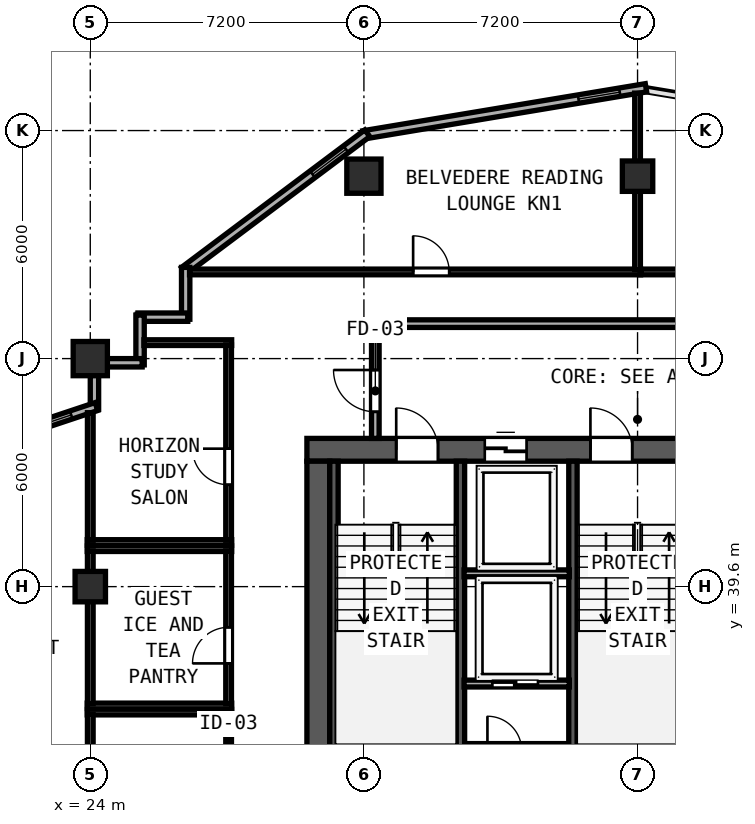
"""IFC4 building model, lengths in metres.
Left out: names, types, materials, properties, quantities, classifications, styles, units other than length and angle.
Written with IfcOpenShell. Run it as: python <this file> out.ifc"""

import sys

from ifc_helpers import new_model, si_unit, direction, frame, frame_2d, origin, origin_2d, place, context, subcontext, project, spatial, rectangle, hollow_rectangle, extrude, element, fill, save


model = new_model("IFC4")
c1 = context("Model", 3, precision=1e-05, world=origin(), true_north=direction((0.0, 1.0)))
c2 = subcontext(c1, "Body", "Model", "MODEL_VIEW")
j1 = project(units=[si_unit("LENGTHUNIT", "METRE"), si_unit("PLANEANGLEUNIT", "RADIAN")], contexts=[c1])
p1 = place(None, origin())
s1 = spatial("IfcSite", under=j1, at=p1, CompositionType="ELEMENT")
p2 = place(p1, origin())
s2 = spatial("IfcBuilding", under=s1, at=p2, CompositionType="ELEMENT")
p3 = place(p2, frame((0.0, 0.0, 176.6)))
s3 = spatial("IfcBuildingStorey", under=s2, at=p3, CompositionType="ELEMENT", Elevation=176.6)
p4 = place(p3, frame((29.7, 43.2, 0.0), z_axis=(0.0, 0.0, 1.0), x_axis=(1.0, 0.0, 0.0)))
e1 = element("IfcWall", 1, at=p4, inside=s3, PredefinedType="SHEAR", context=c2, shape_type="SweptSolid", body=[
    extrude(rectangle(XDim=17.4, YDim=0.6, at=frame_2d((8.7, 0.0))), origin(), (0.0, 0.0, 1.0), 3.62),
])
p5 = place(p4, frame((2.35, 0.0, 0.0)))
e2 = element("IfcOpeningElement", 2, at=p5, cuts=e1, PredefinedType="OPENING", context=c2, shape_type="SweptSolid", body=[
    extrude(rectangle(XDim=1.1, YDim=2.15, at=frame_2d((0.55, 1.075))), frame((0.0, 0.31, 0.0), z_axis=(0.0, -1.0, 0.0), x_axis=(1.0, 0.0, 0.0)), (0.0, 0.0, 1.0), 0.62),
])
p6 = place(p4, frame((7.46, 0.0, 0.0)))
e3 = element("IfcOpeningElement", 3, at=p6, cuts=e1, PredefinedType="OPENING", context=c2, shape_type="SweptSolid", body=[
    extrude(rectangle(XDim=1.1, YDim=2.15, at=frame_2d((0.55, 1.075))), frame((0.0, 0.31, 0.0), z_axis=(0.0, -1.0, 0.0), x_axis=(1.0, 0.0, 0.0)), (0.0, 0.0, 1.0), 0.62),
])
p7 = place(p4, frame((13.55, 0.0, 0.0)))
e4 = element("IfcOpeningElement", 4, at=p7, cuts=e1, PredefinedType="OPENING", context=c2, shape_type="SweptSolid", body=[
    extrude(rectangle(XDim=1.1, YDim=2.15, at=frame_2d((0.55, 1.075))), frame((0.0, 0.31, 0.0), z_axis=(0.0, -1.0, 0.0), x_axis=(1.0, 0.0, 0.0)), (0.0, 0.0, 1.0), 0.62),
])
p8 = place(p4, frame((4.68, 0.0, 0.0)))
e5 = element("IfcOpeningElement", 5, at=p8, cuts=e1, PredefinedType="OPENING", context=c2, shape_type="SweptSolid", body=[
    extrude(rectangle(XDim=1.1, YDim=2.2, at=frame_2d((0.55, 1.1))), frame((0.0, 0.31, 0.0), z_axis=(0.0, -1.0, 0.0), x_axis=(1.0, 0.0, 0.0)), (0.0, 0.0, 1.0), 0.62),
])
p9 = place(p4, frame((11.04, 0.0, 0.0)))
e6 = element("IfcOpeningElement", 6, at=p9, cuts=e1, PredefinedType="OPENING", context=c2, shape_type="SweptSolid", body=[
    extrude(rectangle(XDim=1.1, YDim=2.2, at=frame_2d((0.55, 1.1))), frame((0.0, 0.31, 0.0), z_axis=(0.0, -1.0, 0.0), x_axis=(1.0, 0.0, 0.0)), (0.0, 0.0, 1.0), 0.62),
])
p10 = place(p3, frame((30.0, 32.8, 0.0), z_axis=(0.0, 0.0, 1.0), x_axis=(0.0, 1.0, 0.0)))
e7 = element("IfcWall", 7, at=p10, inside=s3, PredefinedType="SHEAR", context=c2, shape_type="SweptSolid", body=[
    extrude(rectangle(XDim=10.1, YDim=0.6, at=frame_2d((5.05, 0.0))), origin(), (0.0, 0.0, 1.0), 3.62),
])
p11 = place(p3, frame((30.3, 35.29, 0.0), z_axis=(0.0, 0.0, 1.0), x_axis=(1.0, 0.0, 0.0)))
e8 = element("IfcWall", 8, at=p11, inside=s3, PredefinedType="SHEAR", context=c2, shape_type="SweptSolid", body=[
    extrude(rectangle(XDim=16.2, YDim=0.36, at=frame_2d((8.1, 0.0))), origin(), (0.0, 0.0, 1.0), 3.62),
])
p12 = place(p11, frame((5.05, 0.0, 0.0), z_axis=(0.0, 0.0, 1.0), x_axis=(-1.0, 0.0, 0.0)))
e9 = element("IfcOpeningElement", 9, at=p12, cuts=e8, PredefinedType="OPENING", context=c2, shape_type="SweptSolid", body=[
    extrude(rectangle(XDim=0.9, YDim=2.1, at=frame_2d((0.45, 1.05))), frame((0.0, 0.19, 0.0), z_axis=(0.0, -1.0, 0.0), x_axis=(1.0, 0.0, 0.0)), (0.0, 0.0, 1.0), 0.38),
])
p13 = place(p11, frame((12.11, 0.0, 0.0), z_axis=(0.0, 0.0, 1.0), x_axis=(-1.0, 0.0, 0.0)))
e10 = element("IfcOpeningElement", 10, at=p13, cuts=e8, PredefinedType="OPENING", context=c2, shape_type="SweptSolid", body=[
    extrude(rectangle(XDim=0.9, YDim=2.1, at=frame_2d((0.45, 1.05))), frame((0.0, 0.19, 0.0), z_axis=(0.0, -1.0, 0.0), x_axis=(1.0, 0.0, 0.0)), (0.0, 0.0, 1.0), 0.38),
])
for number, where, z_axis, x_axis in (
    (11, (30.412, 35.39, 0.0), (0.0, 0.0, 1.0), (0.0, 1.0, 0.0)),
    (12, (33.74, 35.39, 0.0), (0.0, 0.0, 1.0), (0.0, 1.0, 0.0)),
    (13, (36.7, 35.39, 0.0), (0.0, 0.0, 1.0), (0.0, 1.0, 0.0)),
):
    element("IfcWall", number, at=place(p3, frame(where, z_axis=z_axis, x_axis=x_axis)), inside=s3, PredefinedType="SHEAR", context=c2, shape_type="SweptSolid", body=[
        extrude(rectangle(XDim=7.51, YDim=0.22, at=frame_2d((3.755, 0.0))), origin(), (0.0, 0.0, 1.0), 3.62),
    ])
for number, where, z_axis, x_axis in (
    (14, (24.0, 45.6, 0.0), (0.0, 0.0, 1.0), (1.0, 0.0, 0.0)),
    (15, (31.2, 50.4, 0.0), (0.0, 0.0, 1.0), (1.0, 0.0, 0.0)),
):
    element("IfcColumn", number, at=place(p3, frame(where, z_axis=z_axis, x_axis=x_axis)), inside=s3, PredefinedType="COLUMN", context=c2, shape_type="SweptSolid", body=[
        extrude(hollow_rectangle(XDim=0.9, YDim=0.9, WallThickness=0.034, at=origin_2d()), origin(), (0.0, 0.0, 1.0), 3.8),
    ])
for number, where, z_axis, x_axis in (
    (16, (24.0, 39.6, 0.0), (0.0, 0.0, 1.0), (1.0, 0.0, 0.0)),
    (17, (38.4, 50.4, 0.0), (0.0, 0.0, 1.0), (1.0, 0.0, 0.0)),
):
    element("IfcColumn", number, at=place(p3, frame(where, z_axis=z_axis, x_axis=x_axis)), inside=s3, PredefinedType="COLUMN", context=c2, shape_type="SweptSolid", body=[
        extrude(hollow_rectangle(XDim=0.8, YDim=0.8, WallThickness=0.03, at=origin_2d()), origin(), (0.0, 0.0, 1.0), 3.8),
    ])
p14 = place(p3, frame((38.622, 52.726, 0.0), z_axis=(0.0, 0.0, 1.0), x_axis=(-0.986390420428, -0.164420006349, 0.0)))
e18 = element("IfcWall", 18, at=p14, inside=s3, PredefinedType="SOLIDWALL", context=c2, shape_type="SweptSolid", body=[
    extrude(rectangle(XDim=7.534, YDim=0.22, at=frame_2d((3.767, 0.0))), origin(), (0.0, 0.0, 1.0), 3.62),
])
p15 = place(p14, frame((0.7, 0.0, 0.85)))
e19 = element("IfcOpeningElement", 19, at=p15, cuts=e18, PredefinedType="OPENING", context=c2, shape_type="SweptSolid", body=[
    extrude(rectangle(XDim=1.1, YDim=1.75, at=frame_2d((0.55, 0.875))), frame((0.0, 0.12, 0.0), z_axis=(0.0, -1.0, 0.0), x_axis=(1.0, 0.0, 0.0)), (0.0, 0.0, 1.0), 0.24),
])
p16 = place(p3, frame((31.289, 51.529, 0.0), z_axis=(0.0, 0.0, 1.0), x_axis=(-0.800014580093, -0.599980559383, 0.0)))
e20 = element("IfcWall", 20, at=p16, inside=s3, PredefinedType="SOLIDWALL", context=c2, shape_type="SweptSolid", body=[
    extrude(rectangle(XDim=6.028, YDim=0.22, at=frame_2d((3.014, 0.0))), origin(), (0.0, 0.0, 1.0), 3.62),
])
p17 = place(p16, frame((0.7, 0.0, 0.85)))
e21 = element("IfcOpeningElement", 21, at=p17, cuts=e20, PredefinedType="OPENING", context=c2, shape_type="SweptSolid", body=[
    extrude(rectangle(XDim=1.1, YDim=1.75, at=frame_2d((0.55, 0.875))), frame((0.0, 0.12, 0.0), z_axis=(0.0, -1.0, 0.0), x_axis=(1.0, 0.0, 0.0)), (0.0, 0.0, 1.0), 0.24),
])
p18 = place(p3, frame((26.51, 48.0, 0.0), z_axis=(0.0, 0.0, 1.0), x_axis=(0.0, -1.0, 0.0)))
e22 = element("IfcWall", 22, at=p18, inside=s3, PredefinedType="SOLIDWALL", context=c2, shape_type="SweptSolid", body=[
    extrude(rectangle(XDim=1.365, YDim=0.22, at=frame_2d((0.683, 0.0))), origin(), (0.0, 0.0, 1.0), 3.62),
])
for number, where, z_axis, x_axis in (
    (23, (26.565, 46.69, 0.0), (0.0, 0.0, 1.0), (-1.0, 0.0, 0.0)),
    (24, (25.31, 46.745, 0.0), (0.0, 0.0, 1.0), (0.0, -1.0, 0.0)),
):
    element("IfcWall", number, at=place(p3, frame(where, z_axis=z_axis, x_axis=x_axis)), inside=s3, PredefinedType="SOLIDWALL", context=c2, shape_type="SweptSolid", body=[
        extrude(rectangle(XDim=1.31, YDim=0.22, at=frame_2d((0.655, 0.0))), origin(), (0.0, 0.0, 1.0), 3.62),
    ])
p19 = place(p3, frame((25.365, 45.49, 0.0), z_axis=(0.0, 0.0, 1.0), x_axis=(-1.0, 0.0, 0.0)))
e25 = element("IfcWall", 25, at=p19, inside=s3, PredefinedType="SOLIDWALL", context=c2, shape_type="SweptSolid", body=[
    extrude(rectangle(XDim=0.923, YDim=0.22, at=frame_2d((0.461, 0.0))), origin(), (0.0, 0.0, 1.0), 3.62),
])
p20 = place(p3, frame((24.11, 45.158, 0.0), z_axis=(0.0, 0.0, 1.0), x_axis=(0.0, -1.0, 0.0)))
e26 = element("IfcWall", 26, at=p20, inside=s3, PredefinedType="SOLIDWALL", context=c2, shape_type="SweptSolid", body=[
    extrude(rectangle(XDim=0.892, YDim=0.22, at=frame_2d((0.446, 0.0))), origin(), (0.0, 0.0, 1.0), 3.215),
])
p21 = place(p3, frame((24.162, 44.338, 0.0), z_axis=(0.0, 0.0, 1.0), x_axis=(-0.948687265055, -0.316215864755, 0.0)))
e27 = element("IfcWall", 27, at=p21, inside=s3, PredefinedType="SOLIDWALL", context=c2, shape_type="SweptSolid", body=[
    extrude(rectangle(XDim=6.154, YDim=0.22, at=frame_2d((3.077, 0.0))), origin(), (0.0, 0.0, 1.0), 3.215),
])
p22 = place(p21, frame((0.7, 0.0, 0.85)))
e28 = element("IfcOpeningElement", 28, at=p22, cuts=e27, PredefinedType="OPENING", context=c2, shape_type="SweptSolid", body=[
    extrude(rectangle(XDim=1.1, YDim=1.75, at=frame_2d((0.55, 0.875))), frame((0.0, 0.12, 0.0), z_axis=(0.0, -1.0, 0.0), x_axis=(1.0, 0.0, 0.0)), (0.0, 0.0, 1.0), 0.24),
])
p23 = place(p3, frame((31.5, 46.52, 0.0), z_axis=(0.0, 0.0, 1.0), x_axis=(1.0, 0.0, 0.0)))
e29 = element("IfcWall", 29, at=p23, inside=s3, PredefinedType="SOLIDWALL", context=c2, shape_type="SweptSolid", body=[
    extrude(rectangle(XDim=13.8, YDim=0.2, at=frame_2d((6.9, 0.0))), origin(), (0.0, 0.0, 1.0), 3.62),
])
p24 = place(p3, frame((31.5, 43.5, 0.0), z_axis=(0.0, 0.0, 1.0), x_axis=(0.0, 1.0, 0.0)))
e30 = element("IfcWall", 30, at=p24, inside=s3, PredefinedType="SOLIDWALL", context=c2, shape_type="SweptSolid", body=[
    extrude(rectangle(XDim=2.935, YDim=0.2, at=frame_2d((1.468, 0.0))), origin(), (0.0, 0.0, 1.0), 3.62),
])
p25 = place(p24, frame((1.8, 0.0, 0.0), z_axis=(0.0, 0.0, 1.0), x_axis=(-1.0, 0.0, 0.0)))
e31 = element("IfcOpeningElement", 31, at=p25, cuts=e30, PredefinedType="OPENING", context=c2, shape_type="SweptSolid", body=[
    extrude(rectangle(XDim=1.1, YDim=2.15, at=frame_2d((0.55, 1.075))), frame((0.0, 0.11, 0.0), z_axis=(0.0, -1.0, 0.0), x_axis=(1.0, 0.0, 0.0)), (0.0, 0.0, 1.0), 0.22),
])
p26 = place(p3, frame((33.835, 39.95, 0.0), z_axis=(0.0, 0.0, 1.0), x_axis=(1.0, 0.0, 0.0)))
e32 = element("IfcWall", 32, at=p26, inside=s3, PredefinedType="SOLIDWALL", context=c2, shape_type="SweptSolid", body=[
    extrude(rectangle(XDim=2.77, YDim=0.18, at=frame_2d((1.385, 0.0))), origin(), (0.0, 0.0, 1.0), 3.62),
])
p27 = place(p3, frame((33.835, 37.05, 0.0), z_axis=(0.0, 0.0, 1.0), x_axis=(1.0, 0.0, 0.0)))
e33 = element("IfcWall", 33, at=p27, inside=s3, PredefinedType="SOLIDWALL", context=c2, shape_type="SweptSolid", body=[
    extrude(rectangle(XDim=2.77, YDim=0.18, at=frame_2d((1.385, 0.0))), origin(), (0.0, 0.0, 1.0), 3.62),
])
p28 = place(p27, frame((1.945, 0.0, 0.0), z_axis=(0.0, 0.0, 1.0), x_axis=(-1.0, 0.0, 0.0)))
e34 = element("IfcOpeningElement", 34, at=p28, cuts=e33, PredefinedType="OPENING", context=c2, shape_type="SweptSolid", body=[
    extrude(rectangle(XDim=1.2, YDim=2.2, at=frame_2d((0.6, 1.1))), frame((0.0, 0.1, 0.0), z_axis=(0.0, -1.0, 0.0), x_axis=(1.0, 0.0, 0.0)), (0.0, 0.0, 1.0), 0.2),
])
p29 = place(p3, frame((23.92, 36.3, 0.0), z_axis=(0.0, 0.0, 1.0), x_axis=(1.0, 0.0, 0.0)))
e35 = element("IfcWall", 35, at=p29, inside=s3, PredefinedType="PARTITIONING", context=c2, shape_type="SweptSolid", body=[
    extrude(rectangle(XDim=3.8, YDim=0.15, at=frame_2d((1.9, 0.0))), origin(), (0.0, 0.0, 1.0), 3.62),
])
p30 = place(p3, frame((24.0, 33.06, 0.0), z_axis=(0.0, 0.0, 1.0), x_axis=(0.0, 1.0, 0.0)))
e36 = element("IfcWall", 36, at=p30, inside=s3, PredefinedType="PARTITIONING", context=c2, shape_type="SweptSolid", body=[
    extrude(rectangle(XDim=3.18, YDim=0.15, at=frame_2d((1.59, 0.0))), origin(), (0.0, 0.0, 1.0), 3.215),
])
p31 = place(p3, frame((27.64, 33.06, 0.0), z_axis=(0.0, 0.0, 1.0), x_axis=(0.0, 1.0, 0.0)))
e37 = element("IfcWall", 37, at=p31, inside=s3, PredefinedType="PARTITIONING", context=c2, shape_type="SweptSolid", body=[
    extrude(rectangle(XDim=3.18, YDim=0.15, at=frame_2d((1.59, 0.0))), origin(), (0.0, 0.0, 1.0), 3.62),
])
p32 = place(p31, frame((1.81, 0.0, 0.0), z_axis=(0.0, 0.0, 1.0), x_axis=(-1.0, 0.0, 0.0)))
e38 = element("IfcOpeningElement", 38, at=p32, cuts=e37, PredefinedType="OPENING", context=c2, shape_type="SweptSolid", body=[
    extrude(rectangle(XDim=0.95, YDim=2.12, at=frame_2d((0.475, 1.06))), frame((0.0, 0.085, 0.0), z_axis=(0.0, -1.0, 0.0), x_axis=(1.0, 0.0, 0.0)), (0.0, 0.0, 1.0), 0.17),
])
for number, where, z_axis, x_axis in (
    (39, (23.92, 40.6, 0.0), (0.0, 0.0, 1.0), (1.0, 0.0, 0.0)),
    (40, (23.92, 36.46, 0.0), (0.0, 0.0, 1.0), (1.0, 0.0, 0.0)),
):
    element("IfcWall", number, at=place(p3, frame(where, z_axis=z_axis, x_axis=x_axis)), inside=s3, PredefinedType="PARTITIONING", context=c2, shape_type="SweptSolid", body=[
        extrude(rectangle(XDim=3.8, YDim=0.15, at=frame_2d((1.9, 0.0))), origin(), (0.0, 0.0, 1.0), 3.62),
    ])
p33 = place(p3, frame((24.0, 36.52, 0.0), z_axis=(0.0, 0.0, 1.0), x_axis=(0.0, 1.0, 0.0)))
e41 = element("IfcWall", 41, at=p33, inside=s3, PredefinedType="PARTITIONING", context=c2, shape_type="SweptSolid", body=[
    extrude(rectangle(XDim=4.02, YDim=0.15, at=frame_2d((2.01, 0.0))), origin(), (0.0, 0.0, 1.0), 3.215),
])
p34 = place(p3, frame((27.64, 36.52, 0.0), z_axis=(0.0, 0.0, 1.0), x_axis=(0.0, 1.0, 0.0)))
e42 = element("IfcWall", 42, at=p34, inside=s3, PredefinedType="PARTITIONING", context=c2, shape_type="SweptSolid", body=[
    extrude(rectangle(XDim=4.02, YDim=0.15, at=frame_2d((2.01, 0.0))), origin(), (0.0, 0.0, 1.0), 3.62),
])
p35 = place(p34, frame((2.01, 0.0, 0.0), z_axis=(0.0, 0.0, 1.0), x_axis=(-1.0, 0.0, 0.0)))
e43 = element("IfcOpeningElement", 43, at=p35, cuts=e42, PredefinedType="OPENING", context=c2, shape_type="SweptSolid", body=[
    extrude(rectangle(XDim=0.95, YDim=2.12, at=frame_2d((0.475, 1.06))), frame((0.0, 0.085, 0.0), z_axis=(0.0, -1.0, 0.0), x_axis=(1.0, 0.0, 0.0)), (0.0, 0.0, 1.0), 0.17),
])
p36 = place(p3, frame((25.412, 46.02, 0.0), z_axis=(0.0, 0.0, 1.0), x_axis=(1.0, 0.0, 0.0)))
e44 = element("IfcWall", 44, at=p36, inside=s3, PredefinedType="PARTITIONING", context=c2, shape_type="SweptSolid", body=[
    extrude(rectangle(XDim=2.308, YDim=0.15, at=frame_2d((1.154, 0.0))), origin(), (0.0, 0.0, 1.0), 3.62),
])
p37 = place(p3, frame((23.92, 40.76, 0.0), z_axis=(0.0, 0.0, 1.0), x_axis=(1.0, 0.0, 0.0)))
e45 = element("IfcWall", 45, at=p37, inside=s3, PredefinedType="PARTITIONING", context=c2, shape_type="SweptSolid", body=[
    extrude(rectangle(XDim=3.8, YDim=0.15, at=frame_2d((1.9, 0.0))), origin(), (0.0, 0.0, 1.0), 3.62),
])
p38 = place(p3, frame((24.0, 40.82, 0.0), z_axis=(0.0, 0.0, 1.0), x_axis=(0.0, 1.0, 0.0)))
e46 = element("IfcWall", 46, at=p38, inside=s3, PredefinedType="PARTITIONING", context=c2, shape_type="SweptSolid", body=[
    extrude(rectangle(XDim=3.356, YDim=0.15, at=frame_2d((1.678, 0.0))), origin(), (0.0, 0.0, 1.0), 3.215),
])
p39 = place(p3, frame((27.64, 40.82, 0.0), z_axis=(0.0, 0.0, 1.0), x_axis=(0.0, 1.0, 0.0)))
e47 = element("IfcWall", 47, at=p39, inside=s3, PredefinedType="PARTITIONING", context=c2, shape_type="SweptSolid", body=[
    extrude(rectangle(XDim=5.14, YDim=0.15, at=frame_2d((2.57, 0.0))), origin(), (0.0, 0.0, 1.0), 3.62),
])
p40 = place(p39, frame((2.41, 0.0, 0.0), z_axis=(0.0, 0.0, 1.0), x_axis=(-1.0, 0.0, 0.0)))
e48 = element("IfcOpeningElement", 48, at=p40, cuts=e47, PredefinedType="OPENING", context=c2, shape_type="SweptSolid", body=[
    extrude(rectangle(XDim=0.95, YDim=2.12, at=frame_2d((0.475, 1.06))), frame((0.0, 0.085, 0.0), z_axis=(0.0, -1.0, 0.0), x_axis=(1.0, 0.0, 0.0)), (0.0, 0.0, 1.0), 0.17),
])
p41 = place(p3, frame((26.612, 47.88, 0.0), z_axis=(0.0, 0.0, 1.0), x_axis=(1.0, 0.0, 0.0)))
e49 = element("IfcWall", 49, at=p41, inside=s3, PredefinedType="PARTITIONING", context=c2, shape_type="SweptSolid", body=[
    extrude(rectangle(XDim=11.868, YDim=0.15, at=frame_2d((5.934, 0.0))), origin(), (0.0, 0.0, 1.0), 3.62),
])
p42 = place(p41, frame((5.883, 0.0, 0.0)))
e50 = element("IfcOpeningElement", 50, at=p42, cuts=e49, PredefinedType="OPENING", context=c2, shape_type="SweptSolid", body=[
    extrude(rectangle(XDim=0.95, YDim=2.12, at=frame_2d((0.475, 1.06))), frame((0.0, 0.085, 0.0), z_axis=(0.0, -1.0, 0.0), x_axis=(1.0, 0.0, 0.0)), (0.0, 0.0, 1.0), 0.17),
])
p43 = place(p3, frame((38.4, 47.94, 0.0), z_axis=(0.0, 0.0, 1.0), x_axis=(0.0, 1.0, 0.0)))
e51 = element("IfcWall", 51, at=p43, inside=s3, PredefinedType="PARTITIONING", context=c2, shape_type="SweptSolid", body=[
    extrude(rectangle(XDim=4.645, YDim=0.15, at=frame_2d((2.323, 0.0))), origin(), (0.0, 0.0, 1.0), 3.62),
])
p44 = place(p3, frame((38.482, 47.88, 0.0), z_axis=(0.0, 0.0, 1.0), x_axis=(1.0, 0.0, 0.0)))
e52 = element("IfcWall", 52, at=p44, inside=s3, PredefinedType="PARTITIONING", context=c2, shape_type="SweptSolid", body=[
    extrude(rectangle(XDim=11.706, YDim=0.15, at=frame_2d((5.853, 0.0))), origin(), (0.0, 0.0, 1.0), 3.62),
])
p45 = place(p44, frame((4.793, 0.0, 0.0)))
e53 = element("IfcOpeningElement", 53, at=p45, cuts=e52, PredefinedType="OPENING", context=c2, shape_type="SweptSolid", body=[
    extrude(rectangle(XDim=0.95, YDim=2.12, at=frame_2d((0.475, 1.06))), frame((0.0, 0.085, 0.0), z_axis=(0.0, -1.0, 0.0), x_axis=(1.0, 0.0, 0.0)), (0.0, 0.0, 1.0), 0.17),
])
p46 = place(p15, origin())
e54 = element("IfcWindow", 54, at=p46, inside=s3, PartitioningType="SINGLE_PANEL", PredefinedType="WINDOW", context=c2, shape_type="SweptSolid", body=[
    extrude(rectangle(XDim=1.1, YDim=1.75, at=frame_2d((0.55, 0.875))), frame((0.0, 0.03, 0.0), z_axis=(0.0, -1.0, 0.0), x_axis=(1.0, 0.0, 0.0)), (0.0, 0.0, 1.0), 0.06),
])
fill(e19, e54)
p47 = place(p17, origin())
e55 = element("IfcWindow", 55, at=p47, inside=s3, PartitioningType="SINGLE_PANEL", PredefinedType="WINDOW", context=c2, shape_type="SweptSolid", body=[
    extrude(rectangle(XDim=1.1, YDim=1.75, at=frame_2d((0.55, 0.875))), frame((0.0, 0.03, 0.0), z_axis=(0.0, -1.0, 0.0), x_axis=(1.0, 0.0, 0.0)), (0.0, 0.0, 1.0), 0.06),
])
fill(e21, e55)
p48 = place(p22, origin())
e56 = element("IfcWindow", 56, at=p48, inside=s3, PartitioningType="SINGLE_PANEL", PredefinedType="WINDOW", context=c2, shape_type="SweptSolid", body=[
    extrude(rectangle(XDim=1.1, YDim=1.75, at=frame_2d((0.55, 0.875))), frame((0.0, 0.03, 0.0), z_axis=(0.0, -1.0, 0.0), x_axis=(1.0, 0.0, 0.0)), (0.0, 0.0, 1.0), 0.06),
])
fill(e28, e56)
p49 = place(p5, origin())
e57 = element("IfcDoor", 57, at=p49, inside=s3, OperationType="SINGLE_SWING_LEFT", PredefinedType="DOOR", context=c2, shape_type="SweptSolid", body=[
    extrude(rectangle(XDim=1.1, YDim=2.15, at=frame_2d((0.55, 1.075))), frame((0.0, 0.185, 0.0), z_axis=(0.0, -1.0, 0.0), x_axis=(1.0, 0.0, 0.0)), (0.0, 0.0, 1.0), 0.05),
])
fill(e2, e57)
p50 = place(p6, origin())
e58 = element("IfcDoor", 58, at=p50, inside=s3, OperationType="SINGLE_SWING_LEFT", PredefinedType="DOOR", context=c2, shape_type="SweptSolid", body=[
    extrude(rectangle(XDim=1.1, YDim=2.15, at=frame_2d((0.55, 1.075))), frame((0.0, 0.185, 0.0), z_axis=(0.0, -1.0, 0.0), x_axis=(1.0, 0.0, 0.0)), (0.0, 0.0, 1.0), 0.05),
])
fill(e3, e58)
p51 = place(p25, origin())
e59 = element("IfcDoor", 59, at=p51, inside=s3, OperationType="SINGLE_SWING_LEFT", PredefinedType="DOOR", context=c2, shape_type="SweptSolid", body=[
    extrude(rectangle(XDim=1.1, YDim=2.15, at=frame_2d((0.55, 1.075))), frame((0.0, 0.025, 0.0), z_axis=(0.0, -1.0, 0.0), x_axis=(1.0, 0.0, 0.0)), (0.0, 0.0, 1.0), 0.05),
])
fill(e31, e59)
p52 = place(p8, origin())
e60 = element("IfcDoor", 60, at=p52, inside=s3, OperationType="SLIDING_TO_LEFT", PredefinedType="DOOR", context=c2, shape_type="SweptSolid", body=[
    extrude(rectangle(XDim=1.1, YDim=2.2, at=frame_2d((0.55, 1.1))), frame((0.0, 0.185, 0.0), z_axis=(0.0, -1.0, 0.0), x_axis=(1.0, 0.0, 0.0)), (0.0, 0.0, 1.0), 0.05),
])
fill(e5, e60)
p53 = place(p28, origin())
e61 = element("IfcDoor", 61, at=p53, inside=s3, OperationType="SLIDING_TO_RIGHT", PredefinedType="DOOR", context=c2, shape_type="SweptSolid", body=[
    extrude(rectangle(XDim=1.2, YDim=2.2, at=frame_2d((0.6, 1.1))), frame((0.0, 0.025, 0.0), z_axis=(0.0, -1.0, 0.0), x_axis=(1.0, 0.0, 0.0)), (0.0, 0.0, 1.0), 0.05),
])
fill(e34, e61)
p54 = place(p35, origin())
e62 = element("IfcDoor", 62, at=p54, inside=s3, OperationType="SINGLE_SWING_RIGHT", PredefinedType="DOOR", context=c2, shape_type="SweptSolid", body=[
    extrude(rectangle(XDim=0.95, YDim=2.12, at=frame_2d((0.475, 1.06))), frame((0.0, 0.025, 0.0), z_axis=(0.0, -1.0, 0.0), x_axis=(1.0, 0.0, 0.0)), (0.0, 0.0, 1.0), 0.05),
])
fill(e43, e62)
p55 = place(p40, origin())
e63 = element("IfcDoor", 63, at=p55, inside=s3, OperationType="SINGLE_SWING_LEFT", PredefinedType="DOOR", context=c2, shape_type="SweptSolid", body=[
    extrude(rectangle(XDim=0.95, YDim=2.12, at=frame_2d((0.475, 1.06))), frame((0.0, 0.025, 0.0), z_axis=(0.0, -1.0, 0.0), x_axis=(1.0, 0.0, 0.0)), (0.0, 0.0, 1.0), 0.05),
])
fill(e48, e63)
p56 = place(p42, origin())
e64 = element("IfcDoor", 64, at=p56, inside=s3, OperationType="SINGLE_SWING_LEFT", PredefinedType="DOOR", context=c2, shape_type="SweptSolid", body=[
    extrude(rectangle(XDim=0.95, YDim=2.12, at=frame_2d((0.475, 1.06))), frame((0.0, 0.025, 0.0), z_axis=(0.0, -1.0, 0.0), x_axis=(1.0, 0.0, 0.0)), (0.0, 0.0, 1.0), 0.05),
])
fill(e50, e64)
save(model, sys.argv[1])
